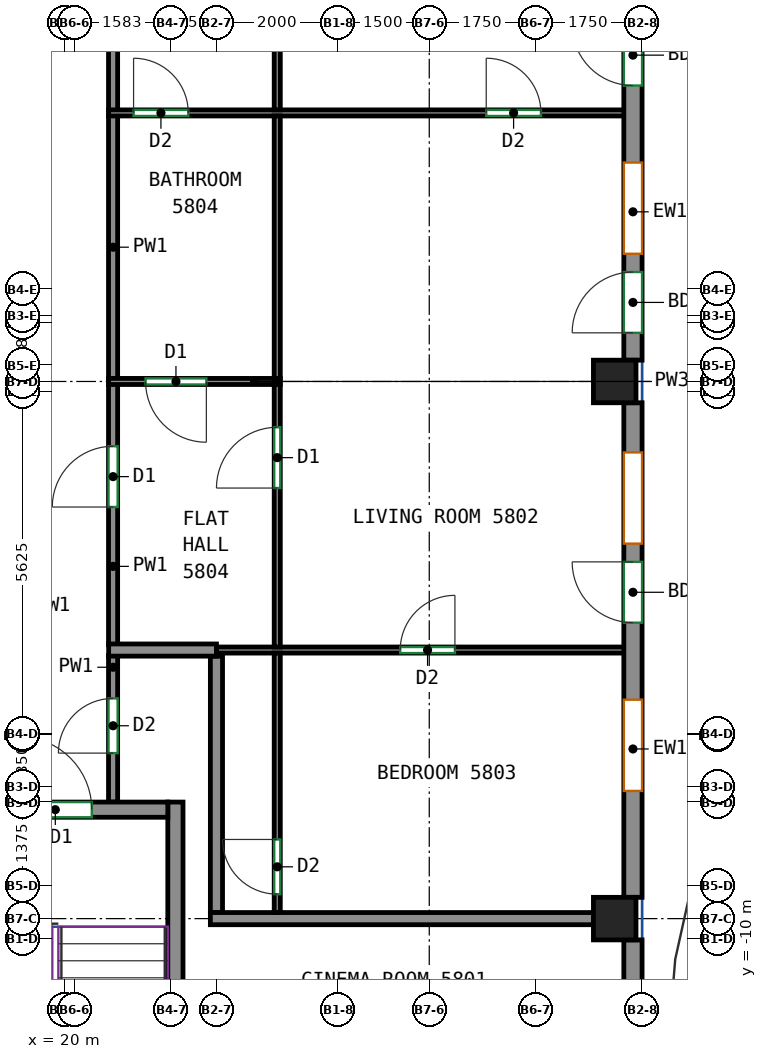
"""IFC4 building model, lengths in metres.
Left out: names, types, materials, properties, quantities, classifications, styles, units other than length and angle.
Written with IfcOpenShell. Run it as: python <this file> out.ifc"""

import sys

from ifc_helpers import new_model, si_unit, direction, frame, frame_2d, origin, origin_2d, place, context, subcontext, project, spatial, rectangle, extrude, source, transform, mapped, element, fill, save


model = new_model("IFC4")
c1 = context("Model", 3, precision=1e-05, world=origin(), true_north=direction((0.0, 1.0)))
c2 = subcontext(c1, "Body", "Model", "MODEL_VIEW")
j1 = project(units=[si_unit("LENGTHUNIT", "METRE"), si_unit("PLANEANGLEUNIT", "RADIAN")], contexts=[c1])
p1 = place(None, origin())
s1 = spatial("IfcSite", under=j1, at=p1, CompositionType="ELEMENT")
p2 = place(p1, origin())
s2 = spatial("IfcBuilding", under=s1, at=p2, CompositionType="ELEMENT")
p3 = place(p2, frame((0.0, 0.0, 242.4)))
s3 = spatial("IfcBuildingStorey", under=s2, at=p3, CompositionType="ELEMENT", Elevation=242.4)
m1 = source(origin(), c2, "Body", "SweptSolid", [
    extrude(rectangle(XDim=0.7, YDim=0.7, at=origin_2d()), origin(), (0.0, 0.0, 1.0), 3.12),
])
for number, where, z_axis, x_axis in (
    (1, (29.05, -9.667, 0.0), (0.0, 0.0, 1.0), (1.0, 0.0, 0.0)),
    (2, (29.05, -0.833, 0.0), (0.0, 0.0, 1.0), (1.0, 0.0, 0.0)),
):
    element("IfcColumn", number, at=place(p3, frame(where, z_axis=z_axis, x_axis=x_axis)), inside=s3, PredefinedType="COLUMN", context=c2, shape_type="MappedRepresentation", body=[
        mapped(m1, transform((0.0, 0.0, 0.0))),
    ])
m2 = source(origin(), c2, "Body", "SweptSolid", [
    extrude(rectangle(XDim=8.0, YDim=0.25, at=frame_2d((4.0, 0.0))), origin(), (0.0, 0.0, 1.0), 3.12),
])
p4 = place(p3, frame((21.825, -15.75, 0.0), z_axis=(0.0, 0.0, 1.0), x_axis=(0.0, 1.0, 0.0)))
e3 = element("IfcWall", 3, at=p4, inside=s3, PredefinedType="SHEAR", context=c2, shape_type="MappedRepresentation", body=[
    mapped(m2, transform((0.0, 0.0, 0.0))),
])
m3 = source(origin(), c2, "Body", "SweptSolid", [
    extrude(rectangle(XDim=3.7, YDim=0.25, at=frame_2d((1.85, 0.0))), origin(), (0.0, 0.0, 1.0), 3.12),
])
p5 = place(p3, frame((18.0, -7.875, 0.0), z_axis=(0.0, 0.0, 1.0), x_axis=(1.0, 0.0, 0.0)))
e4 = element("IfcWall", 4, at=p5, inside=s3, PredefinedType="SHEAR", context=c2, shape_type="MappedRepresentation", body=[
    mapped(m3, transform((0.0, 0.0, 0.0))),
])
p6 = place(p5, frame((1.25, 0.0, 0.0)))
e5 = element("IfcOpeningElement", 5, at=p6, cuts=e4, PredefinedType="OPENING", context=c2, shape_type="SweptSolid", body=[
    extrude(rectangle(XDim=1.2, YDim=2.1, at=frame_2d((0.6, 1.05))), frame((0.0, 0.135, 0.0), z_axis=(0.0, -1.0, 0.0), x_axis=(1.0, 0.0, 0.0)), (0.0, 0.0, 1.0), 0.27),
])
m4 = source(origin(), c2, "Body", "SweptSolid", [
    extrude(rectangle(XDim=4.315, YDim=0.3, at=frame_2d((2.158, 0.0))), origin(), (0.0, 0.0, 1.0), 3.12),
])
p7 = place(p3, frame((29.35, -14.332, 0.0), z_axis=(0.0, 0.0, 1.0), x_axis=(0.0, 1.0, 0.0)))
e6 = element("IfcWall", 6, at=p7, inside=s3, PredefinedType="SOLIDWALL", context=c2, shape_type="MappedRepresentation", body=[
    mapped(m4, transform((0.0, 0.0, 0.0))),
])
p8 = place(p7, frame((1.75, 0.0, 0.8)))
e7 = element("IfcOpeningElement", 7, at=p8, cuts=e6, PredefinedType="OPENING", context=c2, shape_type="SweptSolid", body=[
    extrude(rectangle(XDim=1.5, YDim=2.05, at=frame_2d((0.75, 1.025))), frame((0.0, 0.16, 0.0), z_axis=(0.0, -1.0, 0.0), x_axis=(1.0, 0.0, 0.0)), (0.0, 0.0, 1.0), 0.32),
])
m5 = source(origin(), c2, "Body", "SweptSolid", [
    extrude(rectangle(XDim=8.133, YDim=0.3, at=frame_2d((4.067, 0.0))), origin(), (0.0, 0.0, 1.0), 3.12),
])
p9 = place(p3, frame((29.35, -9.317, 0.0), z_axis=(0.0, 0.0, 1.0), x_axis=(0.0, 1.0, 0.0)))
e8 = element("IfcWall", 8, at=p9, inside=s3, PredefinedType="SOLIDWALL", context=c2, shape_type="MappedRepresentation", body=[
    mapped(m5, transform((0.0, 0.0, 0.0))),
])
p10 = place(p9, frame((1.75, 0.0, 0.8)))
e9 = element("IfcOpeningElement", 9, at=p10, cuts=e8, PredefinedType="OPENING", context=c2, shape_type="SweptSolid", body=[
    extrude(rectangle(XDim=1.5, YDim=2.05, at=frame_2d((0.75, 1.025))), frame((0.0, 0.16, 0.0), z_axis=(0.0, -1.0, 0.0), x_axis=(1.0, 0.0, 0.0)), (0.0, 0.0, 1.0), 0.32),
])
p11 = place(p9, frame((5.817, 0.0, 0.8)))
e10 = element("IfcOpeningElement", 10, at=p11, cuts=e8, PredefinedType="OPENING", context=c2, shape_type="SweptSolid", body=[
    extrude(rectangle(XDim=1.5, YDim=2.05, at=frame_2d((0.75, 1.025))), frame((0.0, 0.16, 0.0), z_axis=(0.0, -1.0, 0.0), x_axis=(1.0, 0.0, 0.0)), (0.0, 0.0, 1.0), 0.32),
])
p12 = place(p9, frame((4.517, 0.0, 0.0)))
e11 = element("IfcOpeningElement", 11, at=p12, cuts=e8, PredefinedType="OPENING", context=c2, shape_type="SweptSolid", body=[
    extrude(rectangle(XDim=1.0, YDim=2.1, at=frame_2d((0.5, 1.05))), frame((0.0, 0.16, 0.0), z_axis=(0.0, -1.0, 0.0), x_axis=(1.0, 0.0, 0.0)), (0.0, 0.0, 1.0), 0.32),
])
p13 = place(p3, frame((29.35, -0.483, 0.0), z_axis=(0.0, 0.0, 1.0), x_axis=(0.0, 1.0, 0.0)))
e12 = element("IfcWall", 12, at=p13, inside=s3, PredefinedType="SOLIDWALL", context=c2, shape_type="MappedRepresentation", body=[
    mapped(m5, transform((0.0, 0.0, 0.0))),
])
p14 = place(p13, frame((1.75, 0.0, 0.8)))
e13 = element("IfcOpeningElement", 13, at=p14, cuts=e12, PredefinedType="OPENING", context=c2, shape_type="SweptSolid", body=[
    extrude(rectangle(XDim=1.5, YDim=2.05, at=frame_2d((0.75, 1.025))), frame((0.0, 0.16, 0.0), z_axis=(0.0, -1.0, 0.0), x_axis=(1.0, 0.0, 0.0)), (0.0, 0.0, 1.0), 0.32),
])
p15 = place(p13, frame((0.45, 0.0, 0.0)))
e14 = element("IfcOpeningElement", 14, at=p15, cuts=e12, PredefinedType="OPENING", context=c2, shape_type="SweptSolid", body=[
    extrude(rectangle(XDim=1.0, YDim=2.1, at=frame_2d((0.5, 1.05))), frame((0.0, 0.16, 0.0), z_axis=(0.0, -1.0, 0.0), x_axis=(1.0, 0.0, 0.0)), (0.0, 0.0, 1.0), 0.32),
])
p16 = place(p13, frame((5.817, 0.0, 0.8)))
e15 = element("IfcOpeningElement", 15, at=p16, cuts=e12, PredefinedType="OPENING", context=c2, shape_type="SweptSolid", body=[
    extrude(rectangle(XDim=1.5, YDim=2.05, at=frame_2d((0.75, 1.025))), frame((0.0, 0.16, 0.0), z_axis=(0.0, -1.0, 0.0), x_axis=(1.0, 0.0, 0.0)), (0.0, 0.0, 1.0), 0.32),
])
p17 = place(p13, frame((4.517, 0.0, 0.0)))
e16 = element("IfcOpeningElement", 16, at=p17, cuts=e12, PredefinedType="OPENING", context=c2, shape_type="SweptSolid", body=[
    extrude(rectangle(XDim=1.0, YDim=2.1, at=frame_2d((0.5, 1.05))), frame((0.0, 0.16, 0.0), z_axis=(0.0, -1.0, 0.0), x_axis=(1.0, 0.0, 0.0)), (0.0, 0.0, 1.0), 0.32),
])
p18 = place(p3, frame((20.8, -7.75, 0.0), z_axis=(0.0, 0.0, 1.0), x_axis=(0.0, 1.0, 0.0)))
e17 = element("IfcWall", 17, at=p18, inside=s3, PredefinedType="PARTITIONING", context=c2, shape_type="SweptSolid", body=[
    extrude(rectangle(XDim=2.41, YDim=0.15, at=frame_2d((1.205, 0.0))), origin(), (0.0, 0.0, 1.0), 3.12),
])
p19 = place(p18, frame((0.805, 0.0, 0.0)))
e18 = element("IfcOpeningElement", 18, at=p19, cuts=e17, PredefinedType="OPENING", context=c2, shape_type="SweptSolid", body=[
    extrude(rectangle(XDim=0.9, YDim=2.1, at=frame_2d((0.45, 1.05))), frame((0.0, 0.085, 0.0), z_axis=(0.0, -1.0, 0.0), x_axis=(1.0, 0.0, 0.0)), (0.0, 0.0, 1.0), 0.17),
])
p20 = place(p3, frame((20.8, -5.16, 0.0), z_axis=(0.0, 0.0, 1.0), x_axis=(0.0, 1.0, 0.0)))
e19 = element("IfcWall", 19, at=p20, inside=s3, PredefinedType="PARTITIONING", context=c2, shape_type="SweptSolid", body=[
    extrude(rectangle(XDim=4.287, YDim=0.15, at=frame_2d((2.144, 0.0))), origin(), (0.0, 0.0, 1.0), 3.12),
])
p21 = place(p20, frame((2.262, 0.0, 0.0)))
e20 = element("IfcOpeningElement", 20, at=p21, cuts=e19, PredefinedType="OPENING", context=c2, shape_type="SweptSolid", body=[
    extrude(rectangle(XDim=1.0, YDim=2.1, at=frame_2d((0.5, 1.05))), frame((0.0, 0.085, 0.0), z_axis=(0.0, -1.0, 0.0), x_axis=(1.0, 0.0, 0.0)), (0.0, 0.0, 1.0), 0.17),
])
p22 = place(p3, frame((20.8, -0.793, 0.0), z_axis=(0.0, 0.0, 1.0), x_axis=(0.0, 1.0, 0.0)))
e21 = element("IfcWall", 21, at=p22, inside=s3, PredefinedType="PARTITIONING", context=c2, shape_type="SweptSolid", body=[
    extrude(rectangle(XDim=4.336, YDim=0.15, at=frame_2d((2.168, 0.0))), origin(), (0.0, 0.0, 1.0), 3.12),
])
p23 = place(p3, frame((20.8, 3.623, 0.0), z_axis=(0.0, 0.0, 1.0), x_axis=(0.0, 1.0, 0.0)))
e22 = element("IfcWall", 22, at=p23, inside=s3, PredefinedType="PARTITIONING", context=c2, shape_type="SweptSolid", body=[
    extrude(rectangle(XDim=4.287, YDim=0.15, at=frame_2d((2.144, 0.0))), origin(), (0.0, 0.0, 1.0), 3.12),
])
p24 = place(p3, frame((22.5, -9.567, 0.0), z_axis=(0.0, 0.0, 1.0), x_axis=(0.0, 1.0, 0.0)))
e23 = element("IfcWall", 23, at=p24, inside=s3, PredefinedType="PARTITIONING", context=c2, shape_type="SweptSolid", body=[
    extrude(rectangle(XDim=4.217, YDim=0.2, at=frame_2d((2.108, 0.0))), origin(), (0.0, 0.0, 1.0), 3.12),
])
p25 = place(p3, frame((22.4, -9.667, 0.0), z_axis=(0.0, 0.0, 1.0), x_axis=(1.0, 0.0, 0.0)))
e24 = element("IfcWall", 24, at=p25, inside=s3, PredefinedType="PARTITIONING", context=c2, shape_type="SweptSolid", body=[
    extrude(rectangle(XDim=6.3, YDim=0.2, at=frame_2d((3.15, 0.0))), origin(), (0.0, 0.0, 1.0), 3.12),
])
p26 = place(p3, frame((20.727, -5.25, 0.0), z_axis=(0.0, 0.0, 1.0), x_axis=(1.0, 0.0, 0.0)))
e25 = element("IfcWall", 25, at=p26, inside=s3, PredefinedType="PARTITIONING", context=c2, shape_type="SweptSolid", body=[
    extrude(rectangle(XDim=1.773, YDim=0.2, at=frame_2d((0.886, 0.0))), origin(), (0.0, 0.0, 1.0), 3.12),
])
p27 = place(p3, frame((22.5, -5.25, 0.0), z_axis=(0.0, 0.0, 1.0), x_axis=(1.0, 0.0, 0.0)))
e26 = element("IfcWall", 26, at=p27, inside=s3, PredefinedType="PARTITIONING", context=c2, shape_type="SweptSolid", body=[
    extrude(rectangle(XDim=6.75, YDim=0.1, at=frame_2d((3.375, 0.0))), origin(), (0.0, 0.0, 1.0), 3.12),
])
p28 = place(p27, frame((3.022, 0.0, 0.0)))
e27 = element("IfcOpeningElement", 27, at=p28, cuts=e26, PredefinedType="OPENING", context=c2, shape_type="SweptSolid", body=[
    extrude(rectangle(XDim=0.9, YDim=2.1, at=frame_2d((0.45, 1.05))), frame((0.0, 0.06, 0.0), z_axis=(0.0, -1.0, 0.0), x_axis=(1.0, 0.0, 0.0)), (0.0, 0.0, 1.0), 0.12),
])
p29 = place(p3, frame((23.5, -9.567, 0.0), z_axis=(0.0, 0.0, 1.0), x_axis=(0.0, 1.0, 0.0)))
e28 = element("IfcWall", 28, at=p29, inside=s3, PredefinedType="PARTITIONING", context=c2, shape_type="SweptSolid", body=[
    extrude(rectangle(XDim=4.267, YDim=0.1, at=frame_2d((2.133, 0.0))), origin(), (0.0, 0.0, 1.0), 3.12),
])
p30 = place(p29, frame((0.302, 0.0, 0.0)))
e29 = element("IfcOpeningElement", 29, at=p30, cuts=e28, PredefinedType="OPENING", context=c2, shape_type="SweptSolid", body=[
    extrude(rectangle(XDim=0.9, YDim=2.1, at=frame_2d((0.45, 1.05))), frame((0.0, 0.06, 0.0), z_axis=(0.0, -1.0, 0.0), x_axis=(1.0, 0.0, 0.0)), (0.0, 0.0, 1.0), 0.12),
])
p31 = place(p3, frame((23.55, -0.833, 0.0), z_axis=(0.0, 0.0, 1.0), x_axis=(-1.0, 0.0, 0.0)))
e30 = element("IfcWall", 30, at=p31, inside=s3, PredefinedType="PARTITIONING", context=c2, shape_type="SweptSolid", body=[
    extrude(rectangle(XDim=2.823, YDim=0.1, at=frame_2d((1.412, 0.0))), origin(), (0.0, 0.0, 1.0), 2.57),
])
p32 = place(p31, frame((1.216, 0.0, 0.0)))
e31 = element("IfcOpeningElement", 31, at=p32, cuts=e30, PredefinedType="OPENING", context=c2, shape_type="SweptSolid", body=[
    extrude(rectangle(XDim=1.0, YDim=2.1, at=frame_2d((0.5, 1.05))), frame((0.0, 0.06, 0.0), z_axis=(0.0, -1.0, 0.0), x_axis=(1.0, 0.0, 0.0)), (0.0, 0.0, 1.0), 0.12),
])
p33 = place(p3, frame((23.5, -5.2, 0.0), z_axis=(0.0, 0.0, 1.0), x_axis=(0.0, 1.0, 0.0)))
e32 = element("IfcWall", 32, at=p33, inside=s3, PredefinedType="PARTITIONING", context=c2, shape_type="SweptSolid", body=[
    extrude(rectangle(XDim=4.317, YDim=0.1, at=frame_2d((2.158, 0.0))), origin(), (0.0, 0.0, 1.0), 3.12),
])
p34 = place(p33, frame((2.614, 0.0, 0.0)))
e33 = element("IfcOpeningElement", 33, at=p34, cuts=e32, PredefinedType="OPENING", context=c2, shape_type="SweptSolid", body=[
    extrude(rectangle(XDim=1.0, YDim=2.1, at=frame_2d((0.5, 1.05))), frame((0.0, 0.06, 0.0), z_axis=(0.0, -1.0, 0.0), x_axis=(1.0, 0.0, 0.0)), (0.0, 0.0, 1.0), 0.12),
])
p35 = place(p3, frame((20.727, 3.583, 0.0), z_axis=(0.0, 0.0, 1.0), x_axis=(1.0, 0.0, 0.0)))
e34 = element("IfcWall", 34, at=p35, inside=s3, PredefinedType="PARTITIONING", context=c2, shape_type="SweptSolid", body=[
    extrude(rectangle(XDim=8.523, YDim=0.1, at=frame_2d((4.261, 0.0))), origin(), (0.0, 0.0, 1.0), 3.12),
])
p36 = place(p35, frame((0.41, 0.0, 0.0)))
e35 = element("IfcOpeningElement", 35, at=p36, cuts=e34, PredefinedType="OPENING", context=c2, shape_type="SweptSolid", body=[
    extrude(rectangle(XDim=0.9, YDim=2.1, at=frame_2d((0.45, 1.05))), frame((0.0, 0.06, 0.0), z_axis=(0.0, -1.0, 0.0), x_axis=(1.0, 0.0, 0.0)), (0.0, 0.0, 1.0), 0.12),
])
p37 = place(p35, frame((6.21, 0.0, 0.0)))
e36 = element("IfcOpeningElement", 36, at=p37, cuts=e34, PredefinedType="OPENING", context=c2, shape_type="SweptSolid", body=[
    extrude(rectangle(XDim=0.9, YDim=2.1, at=frame_2d((0.45, 1.05))), frame((0.0, 0.06, 0.0), z_axis=(0.0, -1.0, 0.0), x_axis=(1.0, 0.0, 0.0)), (0.0, 0.0, 1.0), 0.12),
])
p38 = place(p3, frame((23.5, -0.783, 0.0), z_axis=(0.0, 0.0, 1.0), x_axis=(0.0, 1.0, 0.0)))
e37 = element("IfcWall", 37, at=p38, inside=s3, PredefinedType="PARTITIONING", context=c2, shape_type="SweptSolid", body=[
    extrude(rectangle(XDim=4.316, YDim=0.1, at=frame_2d((2.158, 0.0))), origin(), (0.0, 0.0, 1.0), 3.12),
])
p39 = place(p3, frame((23.5, 3.633, 0.0), z_axis=(0.0, 0.0, 1.0), x_axis=(0.0, 1.0, 0.0)))
e38 = element("IfcWall", 38, at=p39, inside=s3, PredefinedType="PARTITIONING", context=c2, shape_type="SweptSolid", body=[
    extrude(rectangle(XDim=4.267, YDim=0.1, at=frame_2d((2.133, 0.0))), origin(), (0.0, 0.0, 1.0), 3.12),
])
p40 = place(p10, origin())
e39 = element("IfcWindow", 39, at=p40, inside=s3, PartitioningType="SINGLE_PANEL", PredefinedType="WINDOW", context=c2, shape_type="SweptSolid", body=[
    extrude(rectangle(XDim=1.5, YDim=2.05, at=frame_2d((0.75, 1.025))), frame((0.0, 0.03, 0.0), z_axis=(0.0, -1.0, 0.0), x_axis=(1.0, 0.0, 0.0)), (0.0, 0.0, 1.0), 0.06),
])
fill(e9, e39)
p41 = place(p11, origin())
e40 = element("IfcWindow", 40, at=p41, inside=s3, PartitioningType="SINGLE_PANEL", PredefinedType="WINDOW", context=c2, shape_type="SweptSolid", body=[
    extrude(rectangle(XDim=1.5, YDim=2.05, at=frame_2d((0.75, 1.025))), frame((0.0, 0.03, 0.0), z_axis=(0.0, -1.0, 0.0), x_axis=(1.0, 0.0, 0.0)), (0.0, 0.0, 1.0), 0.06),
])
fill(e10, e40)
p42 = place(p12, origin())
e41 = element("IfcDoor", 41, at=p42, inside=s3, OperationType="SINGLE_SWING_RIGHT", PredefinedType="DOOR", context=c2, shape_type="SweptSolid", body=[
    extrude(rectangle(XDim=1.0, YDim=2.1, at=frame_2d((0.5, 1.05))), frame((0.0, 0.025, 0.0), z_axis=(0.0, -1.0, 0.0), x_axis=(1.0, 0.0, 0.0)), (0.0, 0.0, 1.0), 0.05),
])
fill(e11, e41)
p43 = place(p14, origin())
e42 = element("IfcWindow", 42, at=p43, inside=s3, PartitioningType="SINGLE_PANEL", PredefinedType="WINDOW", context=c2, shape_type="SweptSolid", body=[
    extrude(rectangle(XDim=1.5, YDim=2.05, at=frame_2d((0.75, 1.025))), frame((0.0, 0.03, 0.0), z_axis=(0.0, -1.0, 0.0), x_axis=(1.0, 0.0, 0.0)), (0.0, 0.0, 1.0), 0.06),
])
fill(e13, e42)
p44 = place(p15, origin())
e43 = element("IfcDoor", 43, at=p44, inside=s3, OperationType="SINGLE_SWING_LEFT", PredefinedType="DOOR", context=c2, shape_type="SweptSolid", body=[
    extrude(rectangle(XDim=1.0, YDim=2.1, at=frame_2d((0.5, 1.05))), frame((0.0, 0.025, 0.0), z_axis=(0.0, -1.0, 0.0), x_axis=(1.0, 0.0, 0.0)), (0.0, 0.0, 1.0), 0.05),
])
fill(e14, e43)
p45 = place(p17, origin())
e44 = element("IfcDoor", 44, at=p45, inside=s3, OperationType="SINGLE_SWING_RIGHT", PredefinedType="DOOR", context=c2, shape_type="SweptSolid", body=[
    extrude(rectangle(XDim=1.0, YDim=2.1, at=frame_2d((0.5, 1.05))), frame((0.0, 0.025, 0.0), z_axis=(0.0, -1.0, 0.0), x_axis=(1.0, 0.0, 0.0)), (0.0, 0.0, 1.0), 0.05),
])
fill(e16, e44)
p46 = place(p6, origin())
e45 = element("IfcDoor", 45, at=p46, inside=s3, OperationType="DOUBLE_DOOR_SINGLE_SWING", PredefinedType="DOOR", context=c2, shape_type="SweptSolid", body=[
    extrude(rectangle(XDim=1.2, YDim=2.1, at=frame_2d((0.6, 1.05))), frame((0.0, 0.025, 0.0), z_axis=(0.0, -1.0, 0.0), x_axis=(1.0, 0.0, 0.0)), (0.0, 0.0, 1.0), 0.05),
])
fill(e5, e45)
p47 = place(p30, origin())
e46 = element("IfcDoor", 46, at=p47, inside=s3, OperationType="SINGLE_SWING_RIGHT", PredefinedType="DOOR", context=c2, shape_type="SweptSolid", body=[
    extrude(rectangle(XDim=0.9, YDim=2.1, at=frame_2d((0.45, 1.05))), frame((0.0, 0.025, 0.0), z_axis=(0.0, -1.0, 0.0), x_axis=(1.0, 0.0, 0.0)), (0.0, 0.0, 1.0), 0.05),
])
fill(e29, e46)
p48 = place(p19, origin())
e47 = element("IfcDoor", 47, at=p48, inside=s3, OperationType="SINGLE_SWING_LEFT", PredefinedType="DOOR", context=c2, shape_type="SweptSolid", body=[
    extrude(rectangle(XDim=0.9, YDim=2.1, at=frame_2d((0.45, 1.05))), frame((0.0, 0.025, 0.0), z_axis=(0.0, -1.0, 0.0), x_axis=(1.0, 0.0, 0.0)), (0.0, 0.0, 1.0), 0.05),
])
fill(e18, e47)
p49 = place(p28, origin())
e48 = element("IfcDoor", 48, at=p49, inside=s3, OperationType="SINGLE_SWING_RIGHT", PredefinedType="DOOR", context=c2, shape_type="SweptSolid", body=[
    extrude(rectangle(XDim=0.9, YDim=2.1, at=frame_2d((0.45, 1.05))), frame((0.0, 0.025, 0.0), z_axis=(0.0, -1.0, 0.0), x_axis=(1.0, 0.0, 0.0)), (0.0, 0.0, 1.0), 0.05),
])
fill(e27, e48)
p50 = place(p21, origin())
e49 = element("IfcDoor", 49, at=p50, inside=s3, OperationType="SINGLE_SWING_LEFT", PredefinedType="DOOR", context=c2, shape_type="SweptSolid", body=[
    extrude(rectangle(XDim=1.0, YDim=2.1, at=frame_2d((0.5, 1.05))), frame((0.0, 0.025, 0.0), z_axis=(0.0, -1.0, 0.0), x_axis=(1.0, 0.0, 0.0)), (0.0, 0.0, 1.0), 0.05),
])
fill(e20, e49)
p51 = place(p34, origin())
e50 = element("IfcDoor", 50, at=p51, inside=s3, OperationType="SINGLE_SWING_LEFT", PredefinedType="DOOR", context=c2, shape_type="SweptSolid", body=[
    extrude(rectangle(XDim=1.0, YDim=2.1, at=frame_2d((0.5, 1.05))), frame((0.0, 0.025, 0.0), z_axis=(0.0, -1.0, 0.0), x_axis=(1.0, 0.0, 0.0)), (0.0, 0.0, 1.0), 0.05),
])
fill(e33, e50)
p52 = place(p32, origin())
e51 = element("IfcDoor", 51, at=p52, inside=s3, OperationType="SINGLE_SWING_LEFT", PredefinedType="DOOR", context=c2, shape_type="SweptSolid", body=[
    extrude(rectangle(XDim=1.0, YDim=2.1, at=frame_2d((0.5, 1.05))), frame((0.0, 0.025, 0.0), z_axis=(0.0, -1.0, 0.0), x_axis=(1.0, 0.0, 0.0)), (0.0, 0.0, 1.0), 0.05),
])
fill(e31, e51)
p53 = place(p36, origin())
e52 = element("IfcDoor", 52, at=p53, inside=s3, OperationType="SINGLE_SWING_LEFT", PredefinedType="DOOR", context=c2, shape_type="SweptSolid", body=[
    extrude(rectangle(XDim=0.9, YDim=2.1, at=frame_2d((0.45, 1.05))), frame((0.0, 0.025, 0.0), z_axis=(0.0, -1.0, 0.0), x_axis=(1.0, 0.0, 0.0)), (0.0, 0.0, 1.0), 0.05),
])
fill(e35, e52)
p54 = place(p37, origin())
e53 = element("IfcDoor", 53, at=p54, inside=s3, OperationType="SINGLE_SWING_LEFT", PredefinedType="DOOR", context=c2, shape_type="SweptSolid", body=[
    extrude(rectangle(XDim=0.9, YDim=2.1, at=frame_2d((0.45, 1.05))), frame((0.0, 0.025, 0.0), z_axis=(0.0, -1.0, 0.0), x_axis=(1.0, 0.0, 0.0)), (0.0, 0.0, 1.0), 0.05),
])
fill(e36, e53)
save(model, sys.argv[1])
